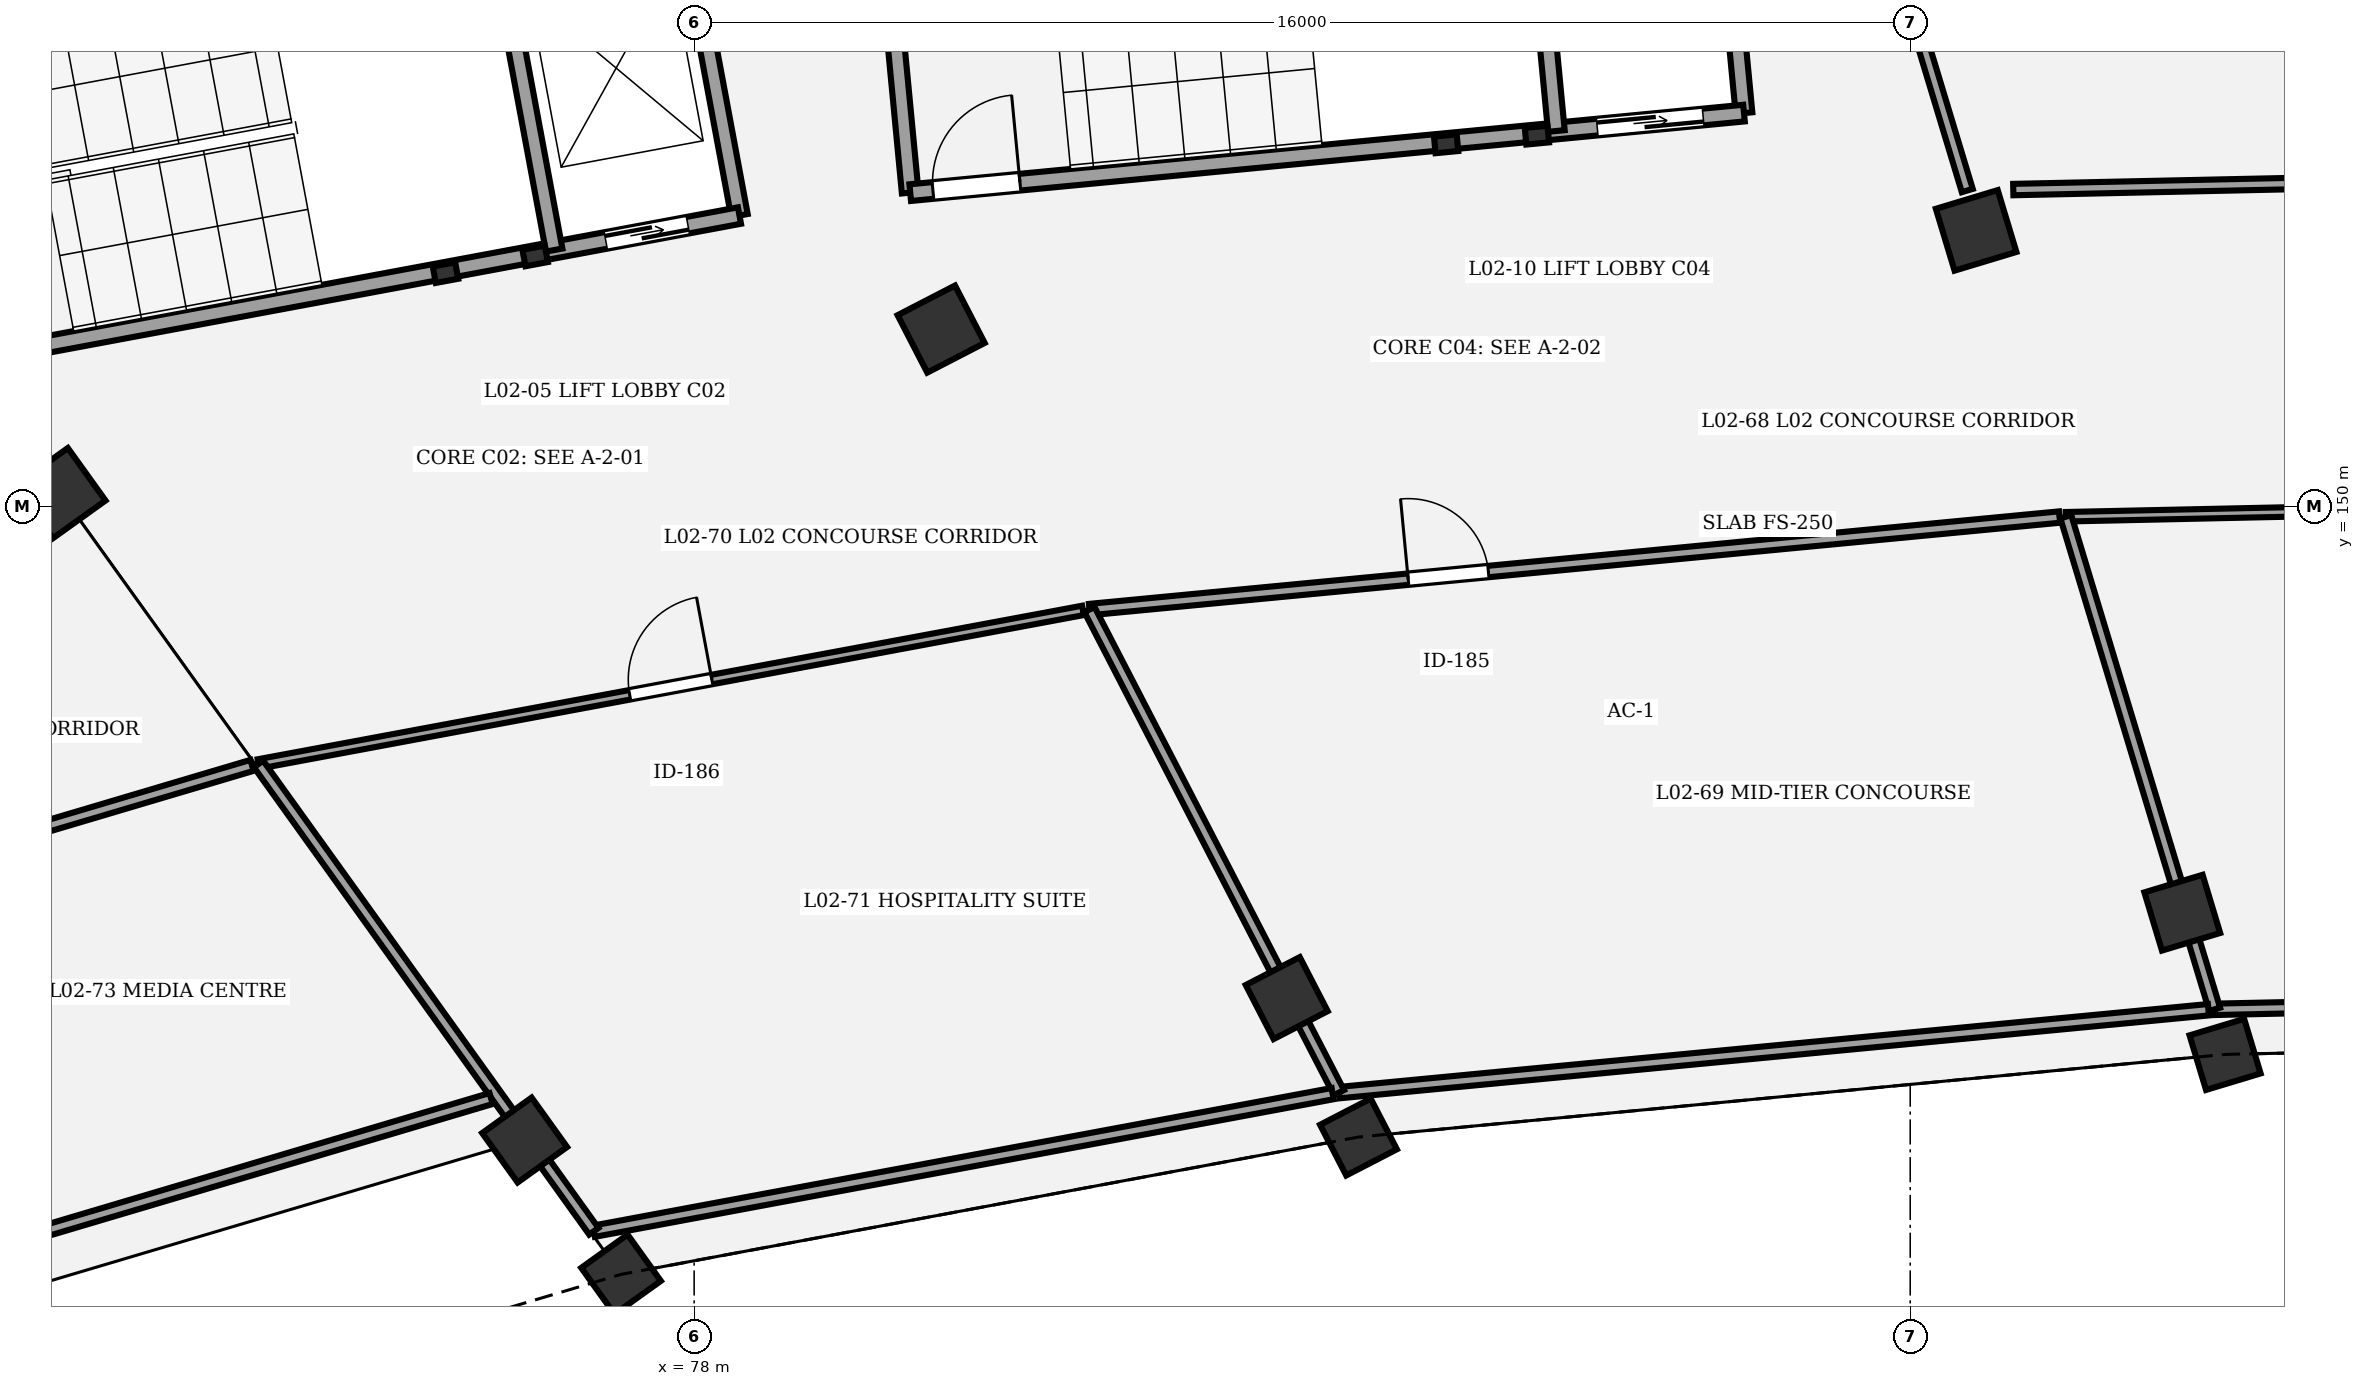
"""IFC4 building model, lengths in metres.
Left out: names, types, materials, properties, quantities, classifications, styles, units other than length and angle.
Written with IfcOpenShell. Run it as: python <this file> out.ifc"""

import sys

from ifc_helpers import new_model, si_unit, direction, frame, frame_2d, origin, origin_2d, place, context, subcontext, project, spatial, rectangle, extrude, element, fill, save


model = new_model("IFC4")
c1 = context("Model", 3, precision=1e-05, world=origin(), true_north=direction((0.0, 1.0)))
c2 = subcontext(c1, "Body", "Model", "MODEL_VIEW")
j1 = project(units=[si_unit("LENGTHUNIT", "METRE"), si_unit("PLANEANGLEUNIT", "RADIAN")], contexts=[c1])
p1 = place(None, origin())
s1 = spatial("IfcSite", under=j1, at=p1, CompositionType="ELEMENT")
p2 = place(p1, origin())
s2 = spatial("IfcBuilding", under=s1, at=p2, CompositionType="ELEMENT")
p3 = place(p2, frame((0.0, 0.0, 10.2)))
s3 = spatial("IfcBuildingStorey", under=s2, at=p3, CompositionType="ELEMENT", Elevation=10.2)
p4 = place(p3, frame((98.143, 142.793, 0.0), z_axis=(0.0, 0.0, 1.0), x_axis=(-0.289198876314, 0.957269037387, 0.0)))
e1 = element("IfcColumn", 1, at=p4, inside=s3, PredefinedType="COLUMN", context=c2, shape_type="SweptSolid", body=[
    extrude(rectangle(XDim=0.75, YDim=0.75, at=origin_2d()), origin(), (0.0, 0.0, 1.0), 4.5),
])
p5 = place(p3, frame((97.58, 144.657, 0.0), z_axis=(0.0, 0.0, 1.0), x_axis=(-0.289198876314, 0.957269037387, 0.0)))
e2 = element("IfcColumn", 2, at=p5, inside=s3, PredefinedType="COLUMN", context=c2, shape_type="SweptSolid", body=[
    extrude(rectangle(XDim=0.8, YDim=0.8, at=origin_2d()), origin(), (0.0, 0.0, 1.0), 4.5),
])
p6 = place(p3, frame((94.867, 153.634, 0.0), z_axis=(0.0, 0.0, 1.0), x_axis=(-0.289198876314, 0.957269037387, 0.0)))
e3 = element("IfcColumn", 3, at=p6, inside=s3, PredefinedType="COLUMN", context=c2, shape_type="SweptSolid", body=[
    extrude(rectangle(XDim=0.85, YDim=0.85, at=origin_2d()), origin(), (0.0, 0.0, 1.0), 4.5),
])
p7 = place(p3, frame((86.741, 141.706, 0.0), z_axis=(0.0, 0.0, 1.0), x_axis=(-0.458959712465, 0.888457079624, 0.0)))
e4 = element("IfcColumn", 4, at=p7, inside=s3, PredefinedType="COLUMN", context=c2, shape_type="SweptSolid", body=[
    extrude(rectangle(XDim=0.75, YDim=0.75, at=origin_2d()), origin(), (0.0, 0.0, 1.0), 4.5),
])
p8 = place(p3, frame((85.796, 143.534, 0.0), z_axis=(0.0, 0.0, 1.0), x_axis=(-0.458959712465, 0.888457079624, 0.0)))
e5 = element("IfcColumn", 5, at=p8, inside=s3, PredefinedType="COLUMN", context=c2, shape_type="SweptSolid", body=[
    extrude(rectangle(XDim=0.8, YDim=0.8, at=origin_2d()), origin(), (0.0, 0.0, 1.0), 4.5),
])
p9 = place(p3, frame((81.25, 152.335, 0.0), z_axis=(0.0, 0.0, 1.0), x_axis=(-0.458959712465, 0.888457079624, 0.0)))
e6 = element("IfcColumn", 6, at=p9, inside=s3, PredefinedType="COLUMN", context=c2, shape_type="SweptSolid", body=[
    extrude(rectangle(XDim=0.85, YDim=0.85, at=origin_2d()), origin(), (0.0, 0.0, 1.0), 4.5),
])
p10 = place(p3, frame((77.038, 139.899, 0.0), z_axis=(0.0, 0.0, 1.0), x_axis=(-0.582974127943, 0.812490717577, 0.0)))
e7 = element("IfcColumn", 7, at=p10, inside=s3, PredefinedType="COLUMN", context=c2, shape_type="SweptSolid", body=[
    extrude(rectangle(XDim=0.75, YDim=0.75, at=origin_2d()), origin(), (0.0, 0.0, 1.0), 4.5),
])
p11 = place(p3, frame((75.77, 141.667, 0.0), z_axis=(0.0, 0.0, 1.0), x_axis=(-0.582974127943, 0.812490717577, 0.0)))
e8 = element("IfcColumn", 8, at=p11, inside=s3, PredefinedType="COLUMN", context=c2, shape_type="SweptSolid", body=[
    extrude(rectangle(XDim=0.8, YDim=0.8, at=origin_2d()), origin(), (0.0, 0.0, 1.0), 4.5),
])
p12 = place(p3, frame((69.662, 150.177, 0.0), z_axis=(0.0, 0.0, 1.0), x_axis=(-0.582974127943, 0.812490717577, 0.0)))
e9 = element("IfcColumn", 9, at=p12, inside=s3, PredefinedType="COLUMN", context=c2, shape_type="SweptSolid", body=[
    extrude(rectangle(XDim=0.85, YDim=0.85, at=origin_2d()), origin(), (0.0, 0.0, 1.0), 4.5),
])
for number, where, z_axis, x_axis in (
    (10, (74.729, 153.078, 0.0), (0.0, 0.0, 1.0), (0.983, 0.183, 0.0)),
    (11, (75.908, 153.298, 0.0), (0.0, 0.0, 1.0), (0.983, 0.183, 0.0)),
):
    element("IfcColumn", number, at=place(p3, frame(where, z_axis=z_axis, x_axis=x_axis)), inside=s3, PredefinedType="COLUMN", context=c2, shape_type="SweptSolid", body=[
        extrude(rectangle(XDim=0.3, YDim=0.22, at=origin_2d()), origin(), (0.0, 0.0, 1.0), 4.5),
    ])
p13 = place(p3, frame((78.596, 153.829, 0.0), z_axis=(0.0, 0.0, 1.0), x_axis=(-0.183078394814, 0.983098317236, 0.0)))
e12 = element("IfcWall", 12, at=p13, inside=s3, PredefinedType="SHEAR", context=c2, shape_type="SweptSolid", body=[
    extrude(rectangle(XDim=4.41, YDim=0.22, at=frame_2d((2.205, 0.0))), origin(), (0.0, 0.0, 1.0), 4.25),
])
p14 = place(p3, frame((67.763, 151.811, 0.0), z_axis=(0.0, 0.0, 1.0), x_axis=(0.983093434234, 0.183104613723, 0.0)))
e13 = element("IfcWall", 13, at=p14, inside=s3, PredefinedType="SHEAR", context=c2, shape_type="SweptSolid", body=[
    extrude(rectangle(XDim=11.02, YDim=0.22, at=frame_2d((5.51, 0.0))), origin(), (0.0, 0.0, 1.0), 4.25),
])
p15 = place(p14, frame((0.3, 0.0, 0.0)))
e14 = element("IfcOpeningElement", 14, at=p15, cuts=e13, PredefinedType="OPENING", context=c2, shape_type="SweptSolid", body=[
    extrude(rectangle(XDim=1.15, YDim=2.15, at=frame_2d((0.575, 1.075))), frame((0.0, 0.12, 0.0), z_axis=(0.0, -1.0, 0.0), x_axis=(1.0, 0.0, 0.0)), (0.0, 0.0, 1.0), 0.24),
])
p16 = place(p14, frame((9.23, 0.0, 0.0)))
e15 = element("IfcOpeningElement", 15, at=p16, cuts=e13, PredefinedType="OPENING", context=c2, shape_type="SweptSolid", body=[
    extrude(rectangle(XDim=1.1, YDim=2.15, at=frame_2d((0.55, 1.075))), frame((0.0, 0.12, 0.0), z_axis=(0.0, -1.0, 0.0), x_axis=(1.0, 0.0, 0.0)), (0.0, 0.0, 1.0), 0.24),
])
p17 = place(p3, frame((76.158, 153.375, 0.0), z_axis=(0.0, 0.0, 1.0), x_axis=(-0.183078394814, 0.983098317236, 0.0)))
e16 = element("IfcWall", 16, at=p17, inside=s3, PredefinedType="SHEAR", context=c2, shape_type="SweptSolid", body=[
    extrude(rectangle(XDim=4.41, YDim=0.22, at=frame_2d((2.205, 0.0))), origin(), (0.0, 0.0, 1.0), 4.25),
])
for number, where, z_axis, x_axis in (
    (17, (87.894, 154.773, 0.0), (0.0, 0.0, 1.0), (0.995, 0.095, 0.0)),
    (18, (89.088, 154.887, 0.0), (0.0, 0.0, 1.0), (0.995, 0.095, 0.0)),
):
    element("IfcColumn", number, at=place(p3, frame(where, z_axis=z_axis, x_axis=x_axis)), inside=s3, PredefinedType="COLUMN", context=c2, shape_type="SweptSolid", body=[
        extrude(rectangle(XDim=0.3, YDim=0.22, at=origin_2d()), origin(), (0.0, 0.0, 1.0), 4.5),
    ])
for number, where, z_axis, x_axis in (
    (19, (80.843, 154.13, 0.0), (0.0, 0.0, 1.0), (-0.095, 0.995, 0.0)),
    (20, (91.813, 155.177, 0.0), (0.0, 0.0, 1.0), (-0.095, 0.995, 0.0)),
):
    element("IfcWall", number, at=place(p3, frame(where, z_axis=z_axis, x_axis=x_axis)), inside=s3, PredefinedType="SHEAR", context=c2, shape_type="SweptSolid", body=[
        extrude(rectangle(XDim=4.41, YDim=0.22, at=frame_2d((2.205, 0.0))), origin(), (0.0, 0.0, 1.0), 4.25),
    ])
p18 = place(p3, frame((80.843, 154.13, 0.0), z_axis=(0.0, 0.0, 1.0), x_axis=(0.995479427285, 0.094977417594, 0.0)))
e21 = element("IfcWall", 21, at=p18, inside=s3, PredefinedType="SHEAR", context=c2, shape_type="SweptSolid", body=[
    extrude(rectangle(XDim=11.02, YDim=0.22, at=frame_2d((5.51, 0.0))), origin(), (0.0, 0.0, 1.0), 4.25),
])
p19 = place(p18, frame((0.3, 0.0, 0.0)))
e22 = element("IfcOpeningElement", 22, at=p19, cuts=e21, PredefinedType="OPENING", context=c2, shape_type="SweptSolid", body=[
    extrude(rectangle(XDim=1.15, YDim=2.15, at=frame_2d((0.575, 1.075))), frame((0.0, 0.12, 0.0), z_axis=(0.0, -1.0, 0.0), x_axis=(1.0, 0.0, 0.0)), (0.0, 0.0, 1.0), 0.24),
])
p20 = place(p18, frame((9.08, 0.0, 0.0)))
e23 = element("IfcOpeningElement", 23, at=p20, cuts=e21, PredefinedType="OPENING", context=c2, shape_type="SweptSolid", body=[
    extrude(rectangle(XDim=1.4, YDim=2.25, at=frame_2d((0.7, 1.125))), frame((0.0, 0.12, 0.0), z_axis=(0.0, -1.0, 0.0), x_axis=(1.0, 0.0, 0.0)), (0.0, 0.0, 1.0), 0.24),
])
p21 = place(p3, frame((89.344, 154.941, 0.0), z_axis=(0.0, 0.0, 1.0), x_axis=(-0.094942328893, 0.995482774429, 0.0)))
e24 = element("IfcWall", 24, at=p21, inside=s3, PredefinedType="SHEAR", context=c2, shape_type="SweptSolid", body=[
    extrude(rectangle(XDim=4.41, YDim=0.22, at=frame_2d((2.205, 0.0))), origin(), (0.0, 0.0, 1.0), 4.25),
])
p22 = place(p3, frame((96.047, 149.866, 0.0), z_axis=(0.0, 0.0, 1.0), x_axis=(0.999768266483, 0.021527037261, 0.0)))
e25 = element("IfcWall", 25, at=p22, inside=s3, PredefinedType="PARTITIONING", context=c2, shape_type="SweptSolid", body=[
    extrude(rectangle(XDim=18.917, YDim=0.125, at=frame_2d((9.458, 0.0))), origin(), (0.0, 0.0, 1.0), 3.25),
])
p23 = place(p22, frame((8.969, 0.0, 0.0)))
e26 = element("IfcOpeningElement", 26, at=p23, cuts=e25, PredefinedType="OPENING", context=c2, shape_type="SweptSolid", body=[
    extrude(rectangle(XDim=0.98, YDim=2.1, at=frame_2d((0.49, 1.05))), frame((0.0, 0.073, 0.0), z_axis=(0.0, -1.0, 0.0), x_axis=(1.0, 0.0, 0.0)), (0.0, 0.0, 1.0), 0.145),
])
p24 = place(p3, frame((114.489, 154.583, 0.0), z_axis=(0.0, 0.0, 1.0), x_axis=(-0.999768107727, -0.021534409017, 0.0)))
e27 = element("IfcWall", 27, at=p24, inside=s3, PredefinedType="PARTITIONING", context=c2, shape_type="SweptSolid", body=[
    extrude(rectangle(XDim=19.137, YDim=0.15, at=frame_2d((9.569, 0.0))), origin(), (0.0, 0.0, 1.0), 3.25),
])
p25 = place(p24, frame((9.059, 0.0, 0.0)))
e28 = element("IfcOpeningElement", 28, at=p25, cuts=e27, PredefinedType="OPENING", context=c2, shape_type="SweptSolid", body=[
    extrude(rectangle(XDim=1.02, YDim=2.1, at=frame_2d((0.51, 1.05))), frame((0.0, 0.085, 0.0), z_axis=(0.0, -1.0, 0.0), x_axis=(1.0, 0.0, 0.0)), (0.0, 0.0, 1.0), 0.17),
])
p26 = place(p3, frame((83.201, 148.645, 0.0), z_axis=(0.0, 0.0, 1.0), x_axis=(0.995485111947, 0.094917816515, 0.0)))
e29 = element("IfcWall", 29, at=p26, inside=s3, PredefinedType="PARTITIONING", context=c2, shape_type="SweptSolid", body=[
    extrude(rectangle(XDim=12.822, YDim=0.15, at=frame_2d((6.411, 0.0))), origin(), (0.0, 0.0, 1.0), 3.25),
])
p27 = place(p26, frame((4.213, 0.0, 0.0)))
e30 = element("IfcOpeningElement", 30, at=p27, cuts=e29, PredefinedType="OPENING", context=c2, shape_type="SweptSolid", body=[
    extrude(rectangle(XDim=1.06, YDim=2.1, at=frame_2d((0.53, 1.05))), frame((0.0, 0.085, 0.0), z_axis=(0.0, -1.0, 0.0), x_axis=(1.0, 0.0, 0.0)), (0.0, 0.0, 1.0), 0.17),
])
p28 = place(p3, frame((72.268, 146.614, 0.0), z_axis=(0.0, 0.0, 1.0), x_axis=(0.983097372707, 0.183083466695, 0.0)))
e31 = element("IfcWall", 31, at=p28, inside=s3, PredefinedType="PARTITIONING", context=c2, shape_type="SweptSolid", body=[
    extrude(rectangle(XDim=11.035, YDim=0.125, at=frame_2d((5.517, 0.0))), origin(), (0.0, 0.0, 1.0), 3.25),
])
p29 = place(p28, frame((4.967, 0.0, 0.0)))
e32 = element("IfcOpeningElement", 32, at=p29, cuts=e31, PredefinedType="OPENING", context=c2, shape_type="SweptSolid", body=[
    extrude(rectangle(XDim=1.1, YDim=2.1, at=frame_2d((0.55, 1.05))), frame((0.0, 0.073, 0.0), z_axis=(0.0, -1.0, 0.0), x_axis=(1.0, 0.0, 0.0)), (0.0, 0.0, 1.0), 0.145),
])
p30 = place(p3, frame((62.701, 143.781, 0.0), z_axis=(0.0, 0.0, 1.0), x_axis=(0.958655809656, 0.284568161629, 0.0)))
e33 = element("IfcWall", 33, at=p30, inside=s3, PredefinedType="PARTITIONING", context=c2, shape_type="SweptSolid", body=[
    extrude(rectangle(XDim=9.891, YDim=0.15, at=frame_2d((4.946, 0.0))), origin(), (0.0, 0.0, 1.0), 3.25),
])
p31 = place(p30, frame((3.159, 0.0, 0.0)))
e34 = element("IfcOpeningElement", 34, at=p31, cuts=e33, PredefinedType="OPENING", context=c2, shape_type="SweptSolid", body=[
    extrude(rectangle(XDim=1.14, YDim=2.1, at=frame_2d((0.57, 1.05))), frame((0.0, 0.085, 0.0), z_axis=(0.0, -1.0, 0.0), x_axis=(1.0, 0.0, 0.0)), (0.0, 0.0, 1.0), 0.17),
])
p32 = place(p3, frame((114.96, 143.751, 0.0), z_axis=(0.0, 0.0, 1.0), x_axis=(-0.99976805362, -0.021536920891, 0.0)))
e35 = element("IfcWall", 35, at=p32, inside=s3, PredefinedType="PARTITIONING", context=c2, shape_type="SweptSolid", body=[
    extrude(rectangle(XDim=16.958, YDim=0.15, at=frame_2d((8.479, 0.0))), origin(), (0.0, 0.0, 1.0), 3.25),
])
p33 = place(p3, frame((98.005, 143.386, 0.0), z_axis=(0.0, 0.0, 1.0), x_axis=(-0.289226587364, 0.957260665212, 0.0)))
e36 = element("IfcWall", 36, at=p33, inside=s3, PredefinedType="PARTITIONING", context=c2, shape_type="SweptSolid", body=[
    extrude(rectangle(XDim=6.77, YDim=0.15, at=frame_2d((3.385, 0.0))), origin(), (0.0, 0.0, 1.0), 3.25),
])
p34 = place(p3, frame((94.751, 154.158, 0.0), z_axis=(0.0, 0.0, 1.0), x_axis=(-0.289195444178, 0.957270074256, 0.0)))
e37 = element("IfcWall", 37, at=p34, inside=s3, PredefinedType="PARTITIONING", context=c2, shape_type="SweptSolid", body=[
    extrude(rectangle(XDim=5.817, YDim=0.15, at=frame_2d((2.909, 0.0))), origin(), (0.0, 0.0, 1.0), 3.25),
])
p35 = place(p3, frame((97.924, 143.381, 0.0), z_axis=(0.0, 0.0, 1.0), x_axis=(-0.995484580871, -0.094923386203, 0.0)))
e38 = element("IfcWall", 38, at=p35, inside=s3, PredefinedType="PARTITIONING", context=c2, shape_type="SweptSolid", body=[
    extrude(rectangle(XDim=11.492, YDim=0.15, at=frame_2d((5.746, 0.0))), origin(), (0.0, 0.0, 1.0), 3.25),
])
p36 = place(p3, frame((86.484, 142.29, 0.0), z_axis=(0.0, 0.0, 1.0), x_axis=(-0.458942826051, 0.888465802615, 0.0)))
e39 = element("IfcWall", 39, at=p36, inside=s3, PredefinedType="PARTITIONING", context=c2, shape_type="SweptSolid", body=[
    extrude(rectangle(XDim=7.153, YDim=0.15, at=frame_2d((3.577, 0.0))), origin(), (0.0, 0.0, 1.0), 3.25),
])
p37 = place(p3, frame((86.401, 142.277, 0.0), z_axis=(0.0, 0.0, 1.0), x_axis=(-0.98309647403, -0.183088292225, 0.0)))
e40 = element("IfcWall", 40, at=p37, inside=s3, PredefinedType="PARTITIONING", context=c2, shape_type="SweptSolid", body=[
    extrude(rectangle(XDim=9.888, YDim=0.15, at=frame_2d((4.944, 0.0))), origin(), (0.0, 0.0, 1.0), 3.25),
])
p38 = place(p3, frame((76.68, 140.467, 0.0), z_axis=(0.0, 0.0, 1.0), x_axis=(-0.583043547447, 0.812440903562, 0.0)))
e41 = element("IfcWall", 41, at=p38, inside=s3, PredefinedType="PARTITIONING", context=c2, shape_type="SweptSolid", body=[
    extrude(rectangle(XDim=7.567, YDim=0.15, at=frame_2d((3.783, 0.0))), origin(), (0.0, 0.0, 1.0), 3.25),
])
p39 = place(p3, frame((75.329, 142.212, 0.0), z_axis=(0.0, 0.0, 1.0), x_axis=(-0.958661639872, -0.284548520005, 0.0)))
e42 = element("IfcWall", 42, at=p39, inside=s3, PredefinedType="PARTITIONING", context=c2, shape_type="SweptSolid", body=[
    extrude(rectangle(XDim=9.157, YDim=0.15, at=frame_2d((4.579, 0.0))), origin(), (0.0, 0.0, 1.0), 3.25),
])
p40 = place(p16, origin())
e43 = element("IfcDoor", 43, at=p40, inside=s3, OperationType="DOUBLE_DOOR_SLIDING", PredefinedType="DOOR", context=c2, shape_type="SweptSolid", body=[
    extrude(rectangle(XDim=1.1, YDim=2.15, at=frame_2d((0.55, 1.075))), frame((0.0, 0.025, 0.0), z_axis=(0.0, -1.0, 0.0), x_axis=(1.0, 0.0, 0.0)), (0.0, 0.0, 1.0), 0.05),
])
fill(e15, e43)
p41 = place(p19, origin())
e44 = element("IfcDoor", 44, at=p41, inside=s3, OperationType="SINGLE_SWING_RIGHT", PredefinedType="DOOR", context=c2, shape_type="SweptSolid", body=[
    extrude(rectangle(XDim=1.15, YDim=2.15, at=frame_2d((0.575, 1.075))), frame((0.0, 0.025, 0.0), z_axis=(0.0, -1.0, 0.0), x_axis=(1.0, 0.0, 0.0)), (0.0, 0.0, 1.0), 0.05),
])
fill(e22, e44)
p42 = place(p20, origin())
e45 = element("IfcDoor", 45, at=p42, inside=s3, OperationType="DOUBLE_DOOR_SLIDING", PredefinedType="DOOR", context=c2, shape_type="SweptSolid", body=[
    extrude(rectangle(XDim=1.4, YDim=2.25, at=frame_2d((0.7, 1.125))), frame((0.0, 0.025, 0.0), z_axis=(0.0, -1.0, 0.0), x_axis=(1.0, 0.0, 0.0)), (0.0, 0.0, 1.0), 0.05),
])
fill(e23, e45)
p43 = place(p27, origin())
e46 = element("IfcDoor", 46, at=p43, inside=s3, OperationType="SINGLE_SWING_LEFT", PredefinedType="DOOR", context=c2, shape_type="SweptSolid", body=[
    extrude(rectangle(XDim=1.06, YDim=2.1, at=frame_2d((0.53, 1.05))), frame((0.0, 0.025, 0.0), z_axis=(0.0, -1.0, 0.0), x_axis=(1.0, 0.0, 0.0)), (0.0, 0.0, 1.0), 0.05),
])
fill(e30, e46)
p44 = place(p29, origin())
e47 = element("IfcDoor", 47, at=p44, inside=s3, OperationType="SINGLE_SWING_RIGHT", PredefinedType="DOOR", context=c2, shape_type="SweptSolid", body=[
    extrude(rectangle(XDim=1.1, YDim=2.1, at=frame_2d((0.55, 1.05))), frame((0.0, 0.025, 0.0), z_axis=(0.0, -1.0, 0.0), x_axis=(1.0, 0.0, 0.0)), (0.0, 0.0, 1.0), 0.05),
])
fill(e32, e47)
save(model, sys.argv[1])
